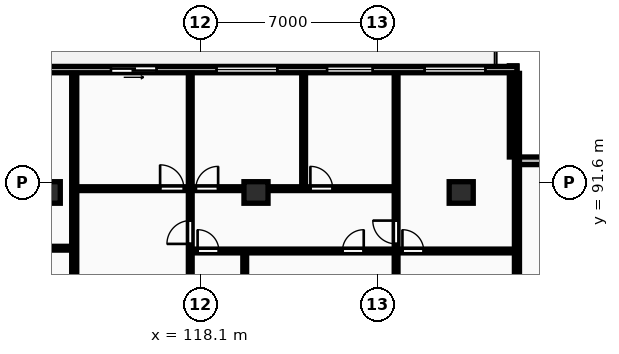
"""IFC4 building model, lengths in metres.
Left out: names, types, materials, properties, quantities, classifications, styles, units other than length and angle.
Written with IfcOpenShell. Run it as: python <this file> out.ifc"""

import sys

from ifc_helpers import new_model, si_unit, direction, frame, frame_2d, origin, origin_2d, place, context, subcontext, project, spatial, rectangle, extrude, element, fill, save


model = new_model("IFC4")
c1 = context("Model", 3, precision=1e-05, world=origin(), true_north=direction((0.0, 1.0)))
c2 = subcontext(c1, "Body", "Model", "MODEL_VIEW")
j1 = project(units=[si_unit("LENGTHUNIT", "METRE"), si_unit("PLANEANGLEUNIT", "RADIAN")], contexts=[c1])
p1 = place(None, origin())
s1 = spatial("IfcSite", under=j1, at=p1, CompositionType="ELEMENT")
p2 = place(p1, origin())
s2 = spatial("IfcBuilding", under=s1, at=p2, CompositionType="ELEMENT")
p3 = place(p2, frame((0.0, 0.0, 132.8)))
s3 = spatial("IfcBuildingStorey", under=s2, at=p3, CompositionType="ELEMENT", Elevation=132.8)
for number, where, z_axis, x_axis in (
    (1, (112.1, 91.2, 0.0), (0.0, 0.0, 1.0), (1.0, 0.0, 0.0)),
    (2, (120.3, 91.2, 0.0), (0.0, 0.0, 1.0), (1.0, 0.0, 0.0)),
    (3, (128.4, 91.2, 0.0), (0.0, 0.0, 1.0), (1.0, 0.0, 0.0)),
):
    element("IfcColumn", number, at=place(p3, frame(where, z_axis=z_axis, x_axis=x_axis)), inside=s3, PredefinedType="COLUMN", context=c2, shape_type="SweptSolid", body=[
        extrude(rectangle(XDim=0.95, YDim=0.85, at=origin_2d()), origin(), (0.0, 0.0, 1.0), 3.25),
    ])
for number, where, z_axis, x_axis in (
    (4, (134.2, 92.45, 0.0), (0.0, 0.0, 1.0), (-1.0, 0.0, 0.0)),
    (5, (130.45, 92.6, 0.0), (0.0, 0.0, 1.0), (0.0, 1.0, 0.0)),
):
    element("IfcWall", number, at=place(p3, frame(where, z_axis=z_axis, x_axis=x_axis)), inside=s3, PredefinedType="STANDARD", context=c2, shape_type="SweptSolid", body=[
        extrude(rectangle(XDim=3.6, YDim=0.3, at=frame_2d((1.8, 0.0))), origin(), (0.0, 0.0, 1.0), 2.97),
    ])
p4 = place(p3, frame((130.6, 96.05, 0.0), z_axis=(0.0, 0.0, 1.0), x_axis=(-1.0, 0.0, 0.0)))
e6 = element("IfcWall", 6, at=p4, inside=s3, PredefinedType="STANDARD", context=c2, shape_type="SweptSolid", body=[
    extrude(rectangle(XDim=73.0, YDim=0.25, at=frame_2d((36.5, 0.0))), origin(), (0.0, 0.0, 1.0), 2.97),
])
p5 = place(p4, frame((68.591, 0.0, 0.0)))
e7 = element("IfcOpeningElement", 7, at=p5, cuts=e6, PredefinedType="OPENING", context=c2, shape_type="SweptSolid", body=[
    extrude(rectangle(XDim=1.8, YDim=2.2, at=frame_2d((0.9, 1.1))), frame((0.0, 0.135, 0.0), z_axis=(0.0, -1.0, 0.0), x_axis=(1.0, 0.0, 0.0)), (0.0, 0.0, 1.0), 0.27),
])
p6 = place(p4, frame((60.092, 0.0, 0.85)))
e8 = element("IfcOpeningElement", 8, at=p6, cuts=e6, PredefinedType="OPENING", context=c2, shape_type="SweptSolid", body=[
    extrude(rectangle(XDim=2.4, YDim=1.9, at=frame_2d((1.2, 0.95))), frame((0.0, 0.135, 0.0), z_axis=(0.0, -1.0, 0.0), x_axis=(1.0, 0.0, 0.0)), (0.0, 0.0, 1.0), 0.27),
])
p7 = place(p4, frame((51.405, 0.0, 0.0)))
e9 = element("IfcOpeningElement", 9, at=p7, cuts=e6, PredefinedType="OPENING", context=c2, shape_type="SweptSolid", body=[
    extrude(rectangle(XDim=1.8, YDim=2.2, at=frame_2d((0.9, 1.1))), frame((0.0, 0.135, 0.0), z_axis=(0.0, -1.0, 0.0), x_axis=(1.0, 0.0, 0.0)), (0.0, 0.0, 1.0), 0.27),
])
p8 = place(p4, frame((41.925, 0.0, 0.85)))
e10 = element("IfcOpeningElement", 10, at=p8, cuts=e6, PredefinedType="OPENING", context=c2, shape_type="SweptSolid", body=[
    extrude(rectangle(XDim=2.4, YDim=1.9, at=frame_2d((1.2, 0.95))), frame((0.0, 0.135, 0.0), z_axis=(0.0, -1.0, 0.0), x_axis=(1.0, 0.0, 0.0)), (0.0, 0.0, 1.0), 0.27),
])
p9 = place(p4, frame((29.296, 0.0, 0.85)))
e11 = element("IfcOpeningElement", 11, at=p9, cuts=e6, PredefinedType="OPENING", context=c2, shape_type="SweptSolid", body=[
    extrude(rectangle(XDim=2.4, YDim=1.9, at=frame_2d((1.2, 0.95))), frame((0.0, 0.135, 0.0), z_axis=(0.0, -1.0, 0.0), x_axis=(1.0, 0.0, 0.0)), (0.0, 0.0, 1.0), 0.27),
])
p10 = place(p4, frame((23.502, 0.0, 0.85)))
e12 = element("IfcOpeningElement", 12, at=p10, cuts=e6, PredefinedType="OPENING", context=c2, shape_type="SweptSolid", body=[
    extrude(rectangle(XDim=2.4, YDim=1.9, at=frame_2d((1.2, 0.95))), frame((0.0, 0.135, 0.0), z_axis=(0.0, -1.0, 0.0), x_axis=(1.0, 0.0, 0.0)), (0.0, 0.0, 1.0), 0.27),
])
p11 = place(p4, frame((34.617, 0.0, 0.0)))
e13 = element("IfcOpeningElement", 13, at=p11, cuts=e6, PredefinedType="OPENING", context=c2, shape_type="SweptSolid", body=[
    extrude(rectangle(XDim=1.8, YDim=2.2, at=frame_2d((0.9, 1.1))), frame((0.0, 0.135, 0.0), z_axis=(0.0, -1.0, 0.0), x_axis=(1.0, 0.0, 0.0)), (0.0, 0.0, 1.0), 0.27),
])
p12 = place(p4, frame((18.5, 0.0, 0.85)))
e14 = element("IfcOpeningElement", 14, at=p12, cuts=e6, PredefinedType="OPENING", context=c2, shape_type="SweptSolid", body=[
    extrude(rectangle(XDim=2.4, YDim=1.9, at=frame_2d((1.2, 0.95))), frame((0.0, 0.135, 0.0), z_axis=(0.0, -1.0, 0.0), x_axis=(1.0, 0.0, 0.0)), (0.0, 0.0, 1.0), 0.27),
])
p13 = place(p4, frame((9.458, 0.0, 0.85)))
e15 = element("IfcOpeningElement", 15, at=p13, cuts=e6, PredefinedType="OPENING", context=c2, shape_type="SweptSolid", body=[
    extrude(rectangle(XDim=2.4, YDim=1.9, at=frame_2d((1.2, 0.95))), frame((0.0, 0.135, 0.0), z_axis=(0.0, -1.0, 0.0), x_axis=(1.0, 0.0, 0.0)), (0.0, 0.0, 1.0), 0.27),
])
p14 = place(p4, frame((5.695, 0.0, 0.85)))
e16 = element("IfcOpeningElement", 16, at=p14, cuts=e6, PredefinedType="OPENING", context=c2, shape_type="SweptSolid", body=[
    extrude(rectangle(XDim=1.8, YDim=1.8, at=frame_2d((0.9, 0.9))), frame((0.0, 0.135, 0.0), z_axis=(0.0, -1.0, 0.0), x_axis=(1.0, 0.0, 0.0)), (0.0, 0.0, 1.0), 0.27),
])
p15 = place(p4, frame((14.225, 0.0, 0.0)))
e17 = element("IfcOpeningElement", 17, at=p15, cuts=e6, PredefinedType="OPENING", context=c2, shape_type="SweptSolid", body=[
    extrude(rectangle(XDim=1.8, YDim=2.2, at=frame_2d((0.9, 1.1))), frame((0.0, 0.135, 0.0), z_axis=(0.0, -1.0, 0.0), x_axis=(1.0, 0.0, 0.0)), (0.0, 0.0, 1.0), 0.27),
])
p16 = place(p4, frame((1.245, 0.0, 0.85)))
e18 = element("IfcOpeningElement", 18, at=p16, cuts=e6, PredefinedType="OPENING", context=c2, shape_type="SweptSolid", body=[
    extrude(rectangle(XDim=2.4, YDim=1.9, at=frame_2d((1.2, 0.95))), frame((0.0, 0.135, 0.0), z_axis=(0.0, -1.0, 0.0), x_axis=(1.0, 0.0, 0.0)), (0.0, 0.0, 1.0), 0.27),
])
for number, where, z_axis, x_axis in (
    (19, (130.6, 69.83, 0.0), (0.0, 0.0, 1.0), (0.0, 1.0, 0.0)),
    (20, (113.125, 69.83, 0.0), (0.0, 0.0, 1.0), (0.0, 1.0, 0.0)),
):
    element("IfcWall", number, at=place(p3, frame(where, z_axis=z_axis, x_axis=x_axis)), inside=s3, PredefinedType="PARTITIONING", context=c2, shape_type="SweptSolid", body=[
        extrude(rectangle(XDim=26.07, YDim=0.2, at=frame_2d((13.035, 0.0))), origin(), (0.0, 0.0, 1.0), 2.97),
    ])
p17 = place(p3, frame((97.248, 89.0, 0.0), z_axis=(0.0, 0.0, 1.0), x_axis=(1.0, 0.0, 0.0)))
e21 = element("IfcWall", 21, at=p17, inside=s3, PredefinedType="PARTITIONING", context=c2, shape_type="SweptSolid", body=[
    extrude(rectangle(XDim=15.797, YDim=0.15, at=frame_2d((7.899, 0.0))), origin(), (0.0, 0.0, 1.0), 2.97),
])
p18 = place(p17, frame((1.191, 0.0, 0.0)))
e22 = element("IfcOpeningElement", 22, at=p18, cuts=e21, PredefinedType="OPENING", context=c2, shape_type="SweptSolid", body=[
    extrude(rectangle(XDim=0.84, YDim=2.04, at=frame_2d((0.42, 1.02))), frame((0.0, 0.085, 0.0), z_axis=(0.0, -1.0, 0.0), x_axis=(1.0, 0.0, 0.0)), (0.0, 0.0, 1.0), 0.17),
])
p19 = place(p17, frame((7.479, 0.0, 0.0)))
e23 = element("IfcOpeningElement", 23, at=p19, cuts=e21, PredefinedType="OPENING", context=c2, shape_type="SweptSolid", body=[
    extrude(rectangle(XDim=0.84, YDim=2.04, at=frame_2d((0.42, 1.02))), frame((0.0, 0.085, 0.0), z_axis=(0.0, -1.0, 0.0), x_axis=(1.0, 0.0, 0.0)), (0.0, 0.0, 1.0), 0.17),
])
p20 = place(p17, frame((11.798, 0.0, 0.0)))
e24 = element("IfcOpeningElement", 24, at=p20, cuts=e21, PredefinedType="OPENING", context=c2, shape_type="SweptSolid", body=[
    extrude(rectangle(XDim=0.84, YDim=2.04, at=frame_2d((0.42, 1.02))), frame((0.0, 0.085, 0.0), z_axis=(0.0, -1.0, 0.0), x_axis=(1.0, 0.0, 0.0)), (0.0, 0.0, 1.0), 0.17),
])
p21 = place(p3, frame((119.855, 86.29, 0.0), z_axis=(0.0, 0.0, 1.0), x_axis=(0.0, 1.0, 0.0)))
e25 = element("IfcWall", 25, at=p21, inside=s3, PredefinedType="PARTITIONING", context=c2, shape_type="SweptSolid", body=[
    extrude(rectangle(XDim=2.58, YDim=0.15, at=frame_2d((1.29, 0.0))), origin(), (0.0, 0.0, 1.0), 2.97),
])
p22 = place(p3, frame((122.18, 91.43, 0.0), z_axis=(0.0, 0.0, 1.0), x_axis=(0.0, 1.0, 0.0)))
e26 = element("IfcWall", 26, at=p22, inside=s3, PredefinedType="PARTITIONING", context=c2, shape_type="SweptSolid", body=[
    extrude(rectangle(XDim=4.47, YDim=0.15, at=frame_2d((2.235, 0.0))), origin(), (0.0, 0.0, 1.0), 2.97),
])
p23 = place(p3, frame((117.705, 86.29, 0.0), z_axis=(0.0, 0.0, 1.0), x_axis=(0.0, 1.0, 0.0)))
e27 = element("IfcWall", 27, at=p23, inside=s3, PredefinedType="PARTITIONING", context=c2, shape_type="SweptSolid", body=[
    extrude(rectangle(XDim=9.61, YDim=0.15, at=frame_2d((4.805, 0.0))), origin(), (0.0, 0.0, 1.0), 2.97),
])
p24 = place(p23, frame((2.88, 0.0, 0.0)))
e28 = element("IfcOpeningElement", 28, at=p24, cuts=e27, PredefinedType="OPENING", context=c2, shape_type="SweptSolid", body=[
    extrude(rectangle(XDim=0.92, YDim=2.08, at=frame_2d((0.46, 1.04))), frame((0.0, 0.085, 0.0), z_axis=(0.0, -1.0, 0.0), x_axis=(1.0, 0.0, 0.0)), (0.0, 0.0, 1.0), 0.17),
])
p25 = place(p3, frame((125.83, 86.29, 0.0), z_axis=(0.0, 0.0, 1.0), x_axis=(0.0, 1.0, 0.0)))
e29 = element("IfcWall", 29, at=p25, inside=s3, PredefinedType="PARTITIONING", context=c2, shape_type="SweptSolid", body=[
    extrude(rectangle(XDim=2.58, YDim=0.15, at=frame_2d((1.29, 0.0))), origin(), (0.0, 0.0, 1.0), 2.97),
])
p26 = place(p3, frame((125.83, 88.91, 0.0), z_axis=(0.0, 0.0, 1.0), x_axis=(0.0, 1.0, 0.0)))
e30 = element("IfcWall", 30, at=p26, inside=s3, PredefinedType="PARTITIONING", context=c2, shape_type="SweptSolid", body=[
    extrude(rectangle(XDim=6.99, YDim=0.15, at=frame_2d((3.495, 0.0))), origin(), (0.0, 0.0, 1.0), 2.97),
])
p27 = place(p26, frame((0.26, 0.0, 0.0)))
e31 = element("IfcOpeningElement", 31, at=p27, cuts=e30, PredefinedType="OPENING", context=c2, shape_type="SweptSolid", body=[
    extrude(rectangle(XDim=0.92, YDim=2.08, at=frame_2d((0.46, 1.04))), frame((0.0, 0.085, 0.0), z_axis=(0.0, -1.0, 0.0), x_axis=(1.0, 0.0, 0.0)), (0.0, 0.0, 1.0), 0.17),
])
p28 = place(p3, frame((117.745, 88.89, 0.0), z_axis=(0.0, 0.0, 1.0), x_axis=(1.0, 0.0, 0.0)))
e32 = element("IfcWall", 32, at=p28, inside=s3, PredefinedType="PARTITIONING", context=c2, shape_type="SweptSolid", body=[
    extrude(rectangle(XDim=12.775, YDim=0.15, at=frame_2d((6.387, 0.0))), origin(), (0.0, 0.0, 1.0), 2.97),
])
p29 = place(p28, frame((0.25, 0.0, 0.0)))
e33 = element("IfcOpeningElement", 33, at=p29, cuts=e32, PredefinedType="OPENING", context=c2, shape_type="SweptSolid", body=[
    extrude(rectangle(XDim=0.84, YDim=2.04, at=frame_2d((0.42, 1.02))), frame((0.0, 0.085, 0.0), z_axis=(0.0, -1.0, 0.0), x_axis=(1.0, 0.0, 0.0)), (0.0, 0.0, 1.0), 0.17),
])
p30 = place(p28, frame((5.968, 0.0, 0.0)))
e34 = element("IfcOpeningElement", 34, at=p30, cuts=e32, PredefinedType="OPENING", context=c2, shape_type="SweptSolid", body=[
    extrude(rectangle(XDim=0.84, YDim=2.04, at=frame_2d((0.42, 1.02))), frame((0.0, 0.085, 0.0), z_axis=(0.0, -1.0, 0.0), x_axis=(1.0, 0.0, 0.0)), (0.0, 0.0, 1.0), 0.17),
])
p31 = place(p28, frame((8.335, 0.0, 0.0)))
e35 = element("IfcOpeningElement", 35, at=p31, cuts=e32, PredefinedType="OPENING", context=c2, shape_type="SweptSolid", body=[
    extrude(rectangle(XDim=0.84, YDim=2.04, at=frame_2d((0.42, 1.02))), frame((0.0, 0.085, 0.0), z_axis=(0.0, -1.0, 0.0), x_axis=(1.0, 0.0, 0.0)), (0.0, 0.0, 1.0), 0.17),
])
p32 = place(p3, frame((113.205, 91.35, 0.0), z_axis=(0.0, 0.0, 1.0), x_axis=(1.0, 0.0, 0.0)))
e36 = element("IfcWall", 36, at=p32, inside=s3, PredefinedType="PARTITIONING", context=c2, shape_type="SweptSolid", body=[
    extrude(rectangle(XDim=12.625, YDim=0.15, at=frame_2d((6.312, 0.0))), origin(), (0.0, 0.0, 1.0), 2.663),
])
p33 = place(p32, frame((3.31, 0.0, 0.0)))
e37 = element("IfcOpeningElement", 37, at=p33, cuts=e36, PredefinedType="OPENING", context=c2, shape_type="SweptSolid", body=[
    extrude(rectangle(XDim=0.94, YDim=2.1, at=frame_2d((0.47, 1.05))), frame((0.0, 0.085, 0.0), z_axis=(0.0, -1.0, 0.0), x_axis=(1.0, 0.0, 0.0)), (0.0, 0.0, 1.0), 0.17),
])
p34 = place(p32, frame((4.72, 0.0, 0.0)))
e38 = element("IfcOpeningElement", 38, at=p34, cuts=e36, PredefinedType="OPENING", context=c2, shape_type="SweptSolid", body=[
    extrude(rectangle(XDim=0.88, YDim=2.06, at=frame_2d((0.44, 1.03))), frame((0.0, 0.085, 0.0), z_axis=(0.0, -1.0, 0.0), x_axis=(1.0, 0.0, 0.0)), (0.0, 0.0, 1.0), 0.17),
])
p35 = place(p32, frame((9.242, 0.0, 0.0)))
e39 = element("IfcOpeningElement", 39, at=p35, cuts=e36, PredefinedType="OPENING", context=c2, shape_type="SweptSolid", body=[
    extrude(rectangle(XDim=0.88, YDim=2.06, at=frame_2d((0.44, 1.03))), frame((0.0, 0.085, 0.0), z_axis=(0.0, -1.0, 0.0), x_axis=(1.0, 0.0, 0.0)), (0.0, 0.0, 1.0), 0.17),
])
p36 = place(p13, origin())
e40 = element("IfcWindow", 40, at=p36, inside=s3, PartitioningType="DOUBLE_PANEL_VERTICAL", PredefinedType="WINDOW", context=c2, shape_type="SweptSolid", body=[
    extrude(rectangle(XDim=2.4, YDim=1.9, at=frame_2d((1.2, 0.95))), frame((0.0, 0.03, 0.0), z_axis=(0.0, -1.0, 0.0), x_axis=(1.0, 0.0, 0.0)), (0.0, 0.0, 1.0), 0.06),
])
fill(e15, e40)
p37 = place(p14, origin())
e41 = element("IfcWindow", 41, at=p37, inside=s3, PartitioningType="SINGLE_PANEL", PredefinedType="WINDOW", context=c2, shape_type="SweptSolid", body=[
    extrude(rectangle(XDim=1.8, YDim=1.8, at=frame_2d((0.9, 0.9))), frame((0.0, 0.03, 0.0), z_axis=(0.0, -1.0, 0.0), x_axis=(1.0, 0.0, 0.0)), (0.0, 0.0, 1.0), 0.06),
])
fill(e16, e41)
p38 = place(p15, origin())
e42 = element("IfcDoor", 42, at=p38, inside=s3, OperationType="SLIDING_TO_LEFT", PredefinedType="DOOR", context=c2, shape_type="SweptSolid", body=[
    extrude(rectangle(XDim=1.8, YDim=2.2, at=frame_2d((0.9, 1.1))), frame((0.0, 0.025, 0.0), z_axis=(0.0, -1.0, 0.0), x_axis=(1.0, 0.0, 0.0)), (0.0, 0.0, 1.0), 0.05),
])
fill(e17, e42)
p39 = place(p16, origin())
e43 = element("IfcWindow", 43, at=p39, inside=s3, PartitioningType="DOUBLE_PANEL_VERTICAL", PredefinedType="WINDOW", context=c2, shape_type="SweptSolid", body=[
    extrude(rectangle(XDim=2.4, YDim=1.9, at=frame_2d((1.2, 0.95))), frame((0.0, 0.03, 0.0), z_axis=(0.0, -1.0, 0.0), x_axis=(1.0, 0.0, 0.0)), (0.0, 0.0, 1.0), 0.06),
])
fill(e18, e43)
p40 = place(p24, origin())
e44 = element("IfcDoor", 44, at=p40, inside=s3, OperationType="SINGLE_SWING_LEFT", PredefinedType="DOOR", context=c2, shape_type="SweptSolid", body=[
    extrude(rectangle(XDim=0.92, YDim=2.08, at=frame_2d((0.46, 1.04))), frame((0.0, 0.025, 0.0), z_axis=(0.0, -1.0, 0.0), x_axis=(1.0, 0.0, 0.0)), (0.0, 0.0, 1.0), 0.05),
])
fill(e28, e44)
p41 = place(p27, origin())
e45 = element("IfcDoor", 45, at=p41, inside=s3, OperationType="SINGLE_SWING_RIGHT", PredefinedType="DOOR", context=c2, shape_type="SweptSolid", body=[
    extrude(rectangle(XDim=0.92, YDim=2.08, at=frame_2d((0.46, 1.04))), frame((0.0, 0.025, 0.0), z_axis=(0.0, -1.0, 0.0), x_axis=(1.0, 0.0, 0.0)), (0.0, 0.0, 1.0), 0.05),
])
fill(e31, e45)
p42 = place(p29, origin())
e46 = element("IfcDoor", 46, at=p42, inside=s3, OperationType="SINGLE_SWING_LEFT", PredefinedType="DOOR", context=c2, shape_type="SweptSolid", body=[
    extrude(rectangle(XDim=0.84, YDim=2.04, at=frame_2d((0.42, 1.02))), frame((0.0, 0.025, 0.0), z_axis=(0.0, -1.0, 0.0), x_axis=(1.0, 0.0, 0.0)), (0.0, 0.0, 1.0), 0.05),
])
fill(e33, e46)
p43 = place(p30, origin())
e47 = element("IfcDoor", 47, at=p43, inside=s3, OperationType="SINGLE_SWING_RIGHT", PredefinedType="DOOR", context=c2, shape_type="SweptSolid", body=[
    extrude(rectangle(XDim=0.84, YDim=2.04, at=frame_2d((0.42, 1.02))), frame((0.0, 0.025, 0.0), z_axis=(0.0, -1.0, 0.0), x_axis=(1.0, 0.0, 0.0)), (0.0, 0.0, 1.0), 0.05),
])
fill(e34, e47)
p44 = place(p31, origin())
e48 = element("IfcDoor", 48, at=p44, inside=s3, OperationType="SINGLE_SWING_LEFT", PredefinedType="DOOR", context=c2, shape_type="SweptSolid", body=[
    extrude(rectangle(XDim=0.84, YDim=2.04, at=frame_2d((0.42, 1.02))), frame((0.0, 0.025, 0.0), z_axis=(0.0, -1.0, 0.0), x_axis=(1.0, 0.0, 0.0)), (0.0, 0.0, 1.0), 0.05),
])
fill(e35, e48)
p45 = place(p33, origin())
e49 = element("IfcDoor", 49, at=p45, inside=s3, OperationType="SINGLE_SWING_LEFT", PredefinedType="DOOR", context=c2, shape_type="SweptSolid", body=[
    extrude(rectangle(XDim=0.94, YDim=2.1, at=frame_2d((0.47, 1.05))), frame((0.0, 0.025, 0.0), z_axis=(0.0, -1.0, 0.0), x_axis=(1.0, 0.0, 0.0)), (0.0, 0.0, 1.0), 0.05),
])
fill(e37, e49)
p46 = place(p34, origin())
e50 = element("IfcDoor", 50, at=p46, inside=s3, OperationType="SINGLE_SWING_RIGHT", PredefinedType="DOOR", context=c2, shape_type="SweptSolid", body=[
    extrude(rectangle(XDim=0.88, YDim=2.06, at=frame_2d((0.44, 1.03))), frame((0.0, 0.025, 0.0), z_axis=(0.0, -1.0, 0.0), x_axis=(1.0, 0.0, 0.0)), (0.0, 0.0, 1.0), 0.05),
])
fill(e38, e50)
p47 = place(p35, origin())
e51 = element("IfcDoor", 51, at=p47, inside=s3, OperationType="SINGLE_SWING_LEFT", PredefinedType="DOOR", context=c2, shape_type="SweptSolid", body=[
    extrude(rectangle(XDim=0.88, YDim=2.06, at=frame_2d((0.44, 1.03))), frame((0.0, 0.025, 0.0), z_axis=(0.0, -1.0, 0.0), x_axis=(1.0, 0.0, 0.0)), (0.0, 0.0, 1.0), 0.05),
])
fill(e39, e51)
save(model, sys.argv[1])
